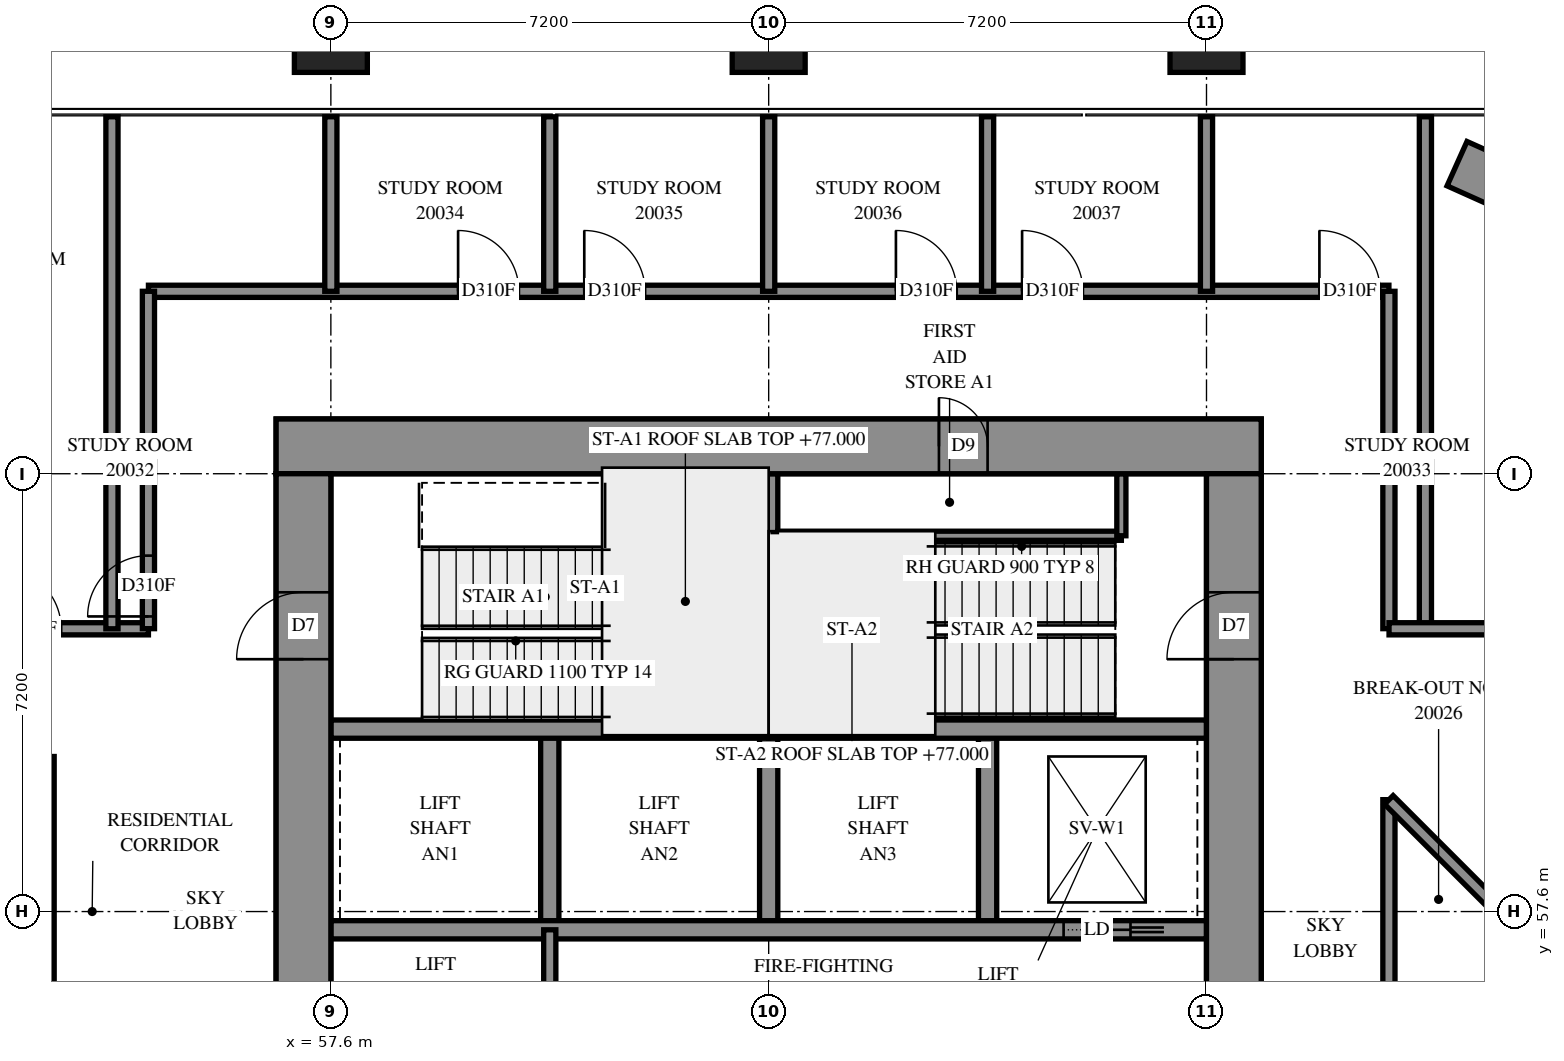
"""IFC4 building model, lengths in metres.
Left out: names, types, materials, properties, quantities, classifications, styles, units other than length and angle.
Written with IfcOpenShell. Run it as: python <this file> out.ifc"""

import sys

from ifc_helpers import new_model, si_unit, direction, frame, frame_2d, origin, origin_2d, place, context, subcontext, project, spatial, rectangle, extrude, element, fill, save


model = new_model("IFC4")
c1 = context("Model", 3, precision=1e-05, world=origin(), true_north=direction((0.0, 1.0)))
c2 = subcontext(c1, "Body", "Model", "MODEL_VIEW")
j1 = project(units=[si_unit("LENGTHUNIT", "METRE"), si_unit("PLANEANGLEUNIT", "RADIAN")], contexts=[c1])
p1 = place(None, origin())
s1 = spatial("IfcSite", under=j1, at=p1, CompositionType="ELEMENT")
p2 = place(p1, origin())
s2 = spatial("IfcBuilding", under=s1, at=p2, CompositionType="ELEMENT")
p3 = place(p2, frame((0.0, 0.0, 77.0)))
s3 = spatial("IfcBuildingStorey", under=s2, at=p3, CompositionType="ELEMENT", Elevation=77.0)
for number, where, z_axis, x_axis in (
    (1, (57.6, 72.0, 0.0), (0.0, 0.0, 1.0), (1.0, 0.0, 0.0)),
    (2, (64.8, 72.0, 0.0), (0.0, 0.0, 1.0), (1.0, 0.0, 0.0)),
    (3, (72.0, 72.0, 0.0), (0.0, 0.0, 1.0), (1.0, 0.0, 0.0)),
):
    element("IfcColumn", number, at=place(p3, frame(where, z_axis=z_axis, x_axis=x_axis)), inside=s3, PredefinedType="COLUMN", context=c2, shape_type="SweptSolid", body=[
        extrude(rectangle(XDim=1.2, YDim=1.2, at=origin_2d()), origin(), (0.0, 0.0, 1.0), 3.9),
    ])
p4 = place(p3, frame((56.7, 65.25, -0.3), z_axis=(0.0, 0.0, 1.0), x_axis=(1.0, 0.0, 0.0)))
e4 = element("IfcWall", 4, at=p4, inside=s3, PredefinedType="SHEAR", context=c2, shape_type="SweptSolid", body=[
    extrude(rectangle(XDim=16.2, YDim=0.9, at=frame_2d((8.1, 0.0))), origin(), (0.0, 0.0, 1.0), 3.5),
])
p5 = place(p4, frame((10.9, 0.0, 0.3)))
e5 = element("IfcOpeningElement", 5, at=p5, cuts=e4, PredefinedType="OPENING", context=c2, shape_type="SweptSolid", body=[
    extrude(rectangle(XDim=0.8, YDim=2.1, at=frame_2d((0.4, 1.05))), frame((0.0, 0.46, 0.0), z_axis=(0.0, -1.0, 0.0), x_axis=(1.0, 0.0, 0.0)), (0.0, 0.0, 1.0), 0.92),
])
p6 = place(p3, frame((57.15, 50.4, -0.3), z_axis=(0.0, 0.0, 1.0), x_axis=(0.0, 1.0, 0.0)))
e6 = element("IfcWall", 6, at=p6, inside=s3, PredefinedType="SHEAR", context=c2, shape_type="SweptSolid", body=[
    extrude(rectangle(XDim=14.4, YDim=0.9, at=frame_2d((7.2, 0.0))), origin(), (0.0, 0.0, 1.0), 3.5),
])
p7 = place(p6, frame((4.55, 0.0, 0.3)))
e7 = element("IfcOpeningElement", 7, at=p7, cuts=e6, PredefinedType="OPENING", context=c2, shape_type="SweptSolid", body=[
    extrude(rectangle(XDim=1.1, YDim=2.1, at=frame_2d((0.55, 1.05))), frame((0.0, 0.46, 0.0), z_axis=(0.0, -1.0, 0.0), x_axis=(1.0, 0.0, 0.0)), (0.0, 0.0, 1.0), 0.92),
])
p8 = place(p6, frame((11.35, 0.0, 0.3)))
e8 = element("IfcOpeningElement", 8, at=p8, cuts=e6, PredefinedType="OPENING", context=c2, shape_type="SweptSolid", body=[
    extrude(rectangle(XDim=1.1, YDim=2.1, at=frame_2d((0.55, 1.05))), frame((0.0, 0.46, 0.0), z_axis=(0.0, -1.0, 0.0), x_axis=(1.0, 0.0, 0.0)), (0.0, 0.0, 1.0), 0.92),
])
p9 = place(p3, frame((72.45, 50.4, -0.3), z_axis=(0.0, 0.0, 1.0), x_axis=(0.0, 1.0, 0.0)))
e9 = element("IfcWall", 9, at=p9, inside=s3, PredefinedType="SHEAR", context=c2, shape_type="SweptSolid", body=[
    extrude(rectangle(XDim=14.4, YDim=0.9, at=frame_2d((7.2, 0.0))), origin(), (0.0, 0.0, 1.0), 3.5),
])
p10 = place(p9, frame((4.55, 0.0, 0.3)))
e10 = element("IfcOpeningElement", 10, at=p10, cuts=e9, PredefinedType="OPENING", context=c2, shape_type="SweptSolid", body=[
    extrude(rectangle(XDim=1.1, YDim=2.1, at=frame_2d((0.55, 1.05))), frame((0.0, 0.46, 0.0), z_axis=(0.0, -1.0, 0.0), x_axis=(1.0, 0.0, 0.0)), (0.0, 0.0, 1.0), 0.92),
])
p11 = place(p9, frame((11.35, 0.0, 0.3)))
e11 = element("IfcOpeningElement", 11, at=p11, cuts=e9, PredefinedType="OPENING", context=c2, shape_type="SweptSolid", body=[
    extrude(rectangle(XDim=1.1, YDim=2.1, at=frame_2d((0.55, 1.05))), frame((0.0, 0.46, 0.0), z_axis=(0.0, -1.0, 0.0), x_axis=(1.0, 0.0, 0.0)), (0.0, 0.0, 1.0), 0.92),
])
for number, where, z_axis, x_axis in (
    (12, (61.2, 57.3, 0.0), (0.0, 0.0, 1.0), (0.0, 1.0, 0.0)),
    (13, (64.8, 57.3, 0.0), (0.0, 0.0, 1.0), (0.0, 1.0, 0.0)),
    (14, (68.4, 57.3, 0.0), (0.0, 0.0, 1.0), (0.0, 1.0, 0.0)),
):
    element("IfcWall", number, at=place(p3, frame(where, z_axis=z_axis, x_axis=x_axis)), inside=s3, PredefinedType="SOLIDWALL", context=c2, shape_type="SweptSolid", body=[
        extrude(rectangle(XDim=3.3, YDim=0.3, at=frame_2d((1.65, 0.0))), origin(), (0.0, 0.0, 1.0), 3.9),
    ])
p12 = place(p3, frame((57.6, 57.3, 0.0), z_axis=(0.0, 0.0, 1.0), x_axis=(1.0, 0.0, 0.0)))
e15 = element("IfcWall", 15, at=p12, inside=s3, PredefinedType="SOLIDWALL", context=c2, shape_type="SweptSolid", body=[
    extrude(rectangle(XDim=14.4, YDim=0.3, at=frame_2d((7.2, 0.0))), origin(), (0.0, 0.0, 1.0), 3.9),
])
p13 = place(p12, frame((12.05, 0.0, 0.0)))
e16 = element("IfcOpeningElement", 16, at=p13, cuts=e15, PredefinedType="OPENING", context=c2, shape_type="SweptSolid", body=[
    extrude(rectangle(XDim=1.1, YDim=2.1, at=frame_2d((0.55, 1.05))), frame((0.0, 0.16, 0.0), z_axis=(0.0, -1.0, 0.0), x_axis=(1.0, 0.0, 0.0)), (0.0, 0.0, 1.0), 0.32),
])
for number, where, z_axis, x_axis in (
    (17, (57.6, 60.6, 0.0), (0.0, 0.0, 1.0), (1.0, 0.0, 0.0)),
    (18, (64.8, 60.6, 0.0), (0.0, 0.0, 1.0), (1.0, 0.0, 0.0)),
):
    element("IfcWall", number, at=place(p3, frame(where, z_axis=z_axis, x_axis=x_axis)), inside=s3, PredefinedType="SOLIDWALL", context=c2, shape_type="SweptSolid", body=[
        extrude(rectangle(XDim=7.2, YDim=0.3, at=frame_2d((3.6, 0.0))), origin(), (0.0, 0.0, 1.0), 3.9),
    ])
p14 = place(p3, frame((64.8, 60.6, 0.0), z_axis=(0.0, 0.0, 1.0), x_axis=(0.0, 1.0, 0.0)))
e19 = element("IfcWall", 19, at=p14, inside=s3, PredefinedType="SOLIDWALL", context=c2, shape_type="SweptSolid", body=[
    extrude(rectangle(XDim=4.2, YDim=0.3, at=frame_2d((2.1, 0.0))), origin(), (0.0, 0.0, 1.0), 3.9),
])
p15 = place(p3, frame((76.336, 49.408, -0.3), z_axis=(0.0, 0.0, 1.0), x_axis=(0.7071067812, 0.7071067812, 0.0)))
e20 = element("IfcWall", 20, at=p15, inside=s3, PredefinedType="SHEAR", context=c2, shape_type="SweptSolid", body=[
    extrude(rectangle(XDim=14.4, YDim=0.9, at=frame_2d((7.2, 0.0))), origin(), (0.0, 0.0, 1.0), 3.5),
])
p16 = place(p15, frame((4.55, 0.0, 0.3)))
e21 = element("IfcOpeningElement", 21, at=p16, cuts=e20, PredefinedType="OPENING", context=c2, shape_type="SweptSolid", body=[
    extrude(rectangle(XDim=1.1, YDim=2.1, at=frame_2d((0.55, 1.05))), frame((0.0, 0.46, 0.0), z_axis=(0.0, -1.0, 0.0), x_axis=(1.0, 0.0, 0.0)), (0.0, 0.0, 1.0), 0.92),
])
p17 = place(p15, frame((11.35, 0.0, 0.3)))
e22 = element("IfcOpeningElement", 22, at=p17, cuts=e20, PredefinedType="OPENING", context=c2, shape_type="SweptSolid", body=[
    extrude(rectangle(XDim=1.1, YDim=2.1, at=frame_2d((0.55, 1.05))), frame((0.0, 0.46, 0.0), z_axis=(0.0, -1.0, 0.0), x_axis=(1.0, 0.0, 0.0)), (0.0, 0.0, 1.0), 0.92),
])
p18 = place(p3, frame((79.28, 68.48, 0.0), z_axis=(0.0, 0.0, 1.0), x_axis=(-0.9122884657, 0.4095482333, 0.0)))
e23 = element("IfcWall", 23, at=p18, inside=s3, PredefinedType="SOLIDWALL", context=c2, shape_type="SweptSolid", body=[
    extrude(rectangle(XDim=3.464, YDim=0.8, at=frame_2d((1.732, 0.0))), origin(), (0.0, 0.0, 1.0), 0.65),
])
p19 = place(p3, frame((64.95, 63.78, 0.0), z_axis=(0.0, 0.0, 1.0), x_axis=(1.0, 0.0, 0.0)))
e24 = element("IfcWall", 24, at=p19, inside=s3, PredefinedType="PARTITIONING", context=c2, shape_type="SweptSolid", body=[
    extrude(rectangle(XDim=5.65, YDim=0.15, at=frame_2d((2.825, 0.0))), origin(), (0.0, 0.0, 1.0), 3.9),
])
p20 = place(p3, frame((70.6, 63.78, 0.0), z_axis=(0.0, 0.0, 1.0), x_axis=(0.0, 1.0, 0.0)))
e25 = element("IfcWall", 25, at=p20, inside=s3, PredefinedType="PARTITIONING", context=c2, shape_type="SweptSolid", body=[
    extrude(rectangle(XDim=1.02, YDim=0.15, at=frame_2d((0.51, 0.0))), origin(), (0.0, 0.0, 1.0), 3.9),
])
p21 = place(p3, frame((61.2, 53.7, 0.0), z_axis=(0.0, 0.0, 1.0), x_axis=(0.0, 1.0, 0.0)))
e26 = element("IfcWall", 26, at=p21, inside=s3, PredefinedType="PARTITIONING", context=c2, shape_type="SweptSolid", body=[
    extrude(rectangle(XDim=3.6, YDim=0.2, at=frame_2d((1.8, 0.0))), origin(), (0.0, 0.0, 1.0), 3.9),
])
p22 = place(p3, frame((33.452, 62.25, 0.0), z_axis=(0.0, 0.0, 1.0), x_axis=(1.0, 0.0, 0.0)))
e27 = element("IfcWall", 27, at=p22, inside=s3, PredefinedType="PARTITIONING", context=c2, shape_type="SweptSolid", body=[
    extrude(rectangle(XDim=21.148, YDim=0.2, at=frame_2d((10.574, 0.0))), origin(), (0.0, 0.0, 1.0), 3.9),
])
p23 = place(p22, frame((6.106, 0.0, 0.0)))
e28 = element("IfcOpeningElement", 28, at=p23, cuts=e27, PredefinedType="OPENING", context=c2, shape_type="SweptSolid", body=[
    extrude(rectangle(XDim=1.0, YDim=2.1, at=frame_2d((0.5, 1.05))), frame((0.0, 0.11, 0.0), z_axis=(0.0, -1.0, 0.0), x_axis=(1.0, 0.0, 0.0)), (0.0, 0.0, 1.0), 0.22),
])
p24 = place(p22, frame((13.306, 0.0, 0.0)))
e29 = element("IfcOpeningElement", 29, at=p24, cuts=e27, PredefinedType="OPENING", context=c2, shape_type="SweptSolid", body=[
    extrude(rectangle(XDim=1.0, YDim=2.1, at=frame_2d((0.5, 1.05))), frame((0.0, 0.11, 0.0), z_axis=(0.0, -1.0, 0.0), x_axis=(1.0, 0.0, 0.0)), (0.0, 0.0, 1.0), 0.22),
])
p25 = place(p22, frame((18.713, 0.0, 0.0)))
e30 = element("IfcOpeningElement", 30, at=p25, cuts=e27, PredefinedType="OPENING", context=c2, shape_type="SweptSolid", body=[
    extrude(rectangle(XDim=1.0, YDim=2.1, at=frame_2d((0.5, 1.05))), frame((0.0, 0.11, 0.0), z_axis=(0.0, -1.0, 0.0), x_axis=(1.0, 0.0, 0.0)), (0.0, 0.0, 1.0), 0.22),
])
p26 = place(p3, frame((54.6, 67.8, 0.0), z_axis=(0.0, 0.0, 1.0), x_axis=(1.0, 0.0, 0.0)))
e31 = element("IfcWall", 31, at=p26, inside=s3, PredefinedType="PARTITIONING", context=c2, shape_type="SweptSolid", body=[
    extrude(rectangle(XDim=20.4, YDim=0.2, at=frame_2d((10.2, 0.0))), origin(), (0.0, 0.0, 1.0), 3.9),
])
p27 = place(p26, frame((19.257, 0.0, 0.0)))
e32 = element("IfcOpeningElement", 32, at=p27, cuts=e31, PredefinedType="OPENING", context=c2, shape_type="SweptSolid", body=[
    extrude(rectangle(XDim=1.0, YDim=2.1, at=frame_2d((0.5, 1.05))), frame((0.0, 0.11, 0.0), z_axis=(0.0, -1.0, 0.0), x_axis=(1.0, 0.0, 0.0)), (0.0, 0.0, 1.0), 0.22),
])
p28 = place(p26, frame((5.093, 0.0, 0.0)))
e33 = element("IfcOpeningElement", 33, at=p28, cuts=e31, PredefinedType="OPENING", context=c2, shape_type="SweptSolid", body=[
    extrude(rectangle(XDim=1.0, YDim=2.1, at=frame_2d((0.5, 1.05))), frame((0.0, 0.11, 0.0), z_axis=(0.0, -1.0, 0.0), x_axis=(1.0, 0.0, 0.0)), (0.0, 0.0, 1.0), 0.22),
])
p29 = place(p26, frame((7.168, 0.0, 0.0)))
e34 = element("IfcOpeningElement", 34, at=p29, cuts=e31, PredefinedType="OPENING", context=c2, shape_type="SweptSolid", body=[
    extrude(rectangle(XDim=1.0, YDim=2.1, at=frame_2d((0.5, 1.05))), frame((0.0, 0.11, 0.0), z_axis=(0.0, -1.0, 0.0), x_axis=(1.0, 0.0, 0.0)), (0.0, 0.0, 1.0), 0.22),
])
p30 = place(p26, frame((12.293, 0.0, 0.0)))
e35 = element("IfcOpeningElement", 35, at=p30, cuts=e31, PredefinedType="OPENING", context=c2, shape_type="SweptSolid", body=[
    extrude(rectangle(XDim=1.0, YDim=2.1, at=frame_2d((0.5, 1.05))), frame((0.0, 0.11, 0.0), z_axis=(0.0, -1.0, 0.0), x_axis=(1.0, 0.0, 0.0)), (0.0, 0.0, 1.0), 0.22),
])
p31 = place(p26, frame((14.367, 0.0, 0.0)))
e36 = element("IfcOpeningElement", 36, at=p31, cuts=e31, PredefinedType="OPENING", context=c2, shape_type="SweptSolid", body=[
    extrude(rectangle(XDim=1.0, YDim=2.1, at=frame_2d((0.5, 1.05))), frame((0.0, 0.11, 0.0), z_axis=(0.0, -1.0, 0.0), x_axis=(1.0, 0.0, 0.0)), (0.0, 0.0, 1.0), 0.22),
])
for number, where, z_axis, x_axis in (
    (37, (54.0, 62.25, 0.0), (0.0, 0.0, 1.0), (0.0, 1.0, 0.0)),
    (38, (75.6, 62.25, 0.0), (0.0, 0.0, 1.0), (0.0, 1.0, 0.0)),
):
    element("IfcWall", number, at=place(p3, frame(where, z_axis=z_axis, x_axis=x_axis)), inside=s3, PredefinedType="PARTITIONING", context=c2, shape_type="SweptSolid", body=[
        extrude(rectangle(XDim=8.42, YDim=0.2, at=frame_2d((4.21, 0.0))), origin(), (0.0, 0.0, 1.0), 3.9),
    ])
p32 = place(p3, frame((54.6, 62.252, 0.0), z_axis=(0.0, 0.0, 1.0), x_axis=(0.0, 1.0, 0.0)))
e39 = element("IfcWall", 39, at=p32, inside=s3, PredefinedType="PARTITIONING", context=c2, shape_type="SweptSolid", body=[
    extrude(rectangle(XDim=5.548, YDim=0.2, at=frame_2d((2.774, 0.0))), origin(), (0.0, 0.0, 1.0), 3.9),
])
p33 = place(p32, frame((0.201, 0.0, 0.0)))
e40 = element("IfcOpeningElement", 40, at=p33, cuts=e39, PredefinedType="OPENING", context=c2, shape_type="SweptSolid", body=[
    extrude(rectangle(XDim=1.0, YDim=2.1, at=frame_2d((0.5, 1.05))), frame((0.0, 0.11, 0.0), z_axis=(0.0, -1.0, 0.0), x_axis=(1.0, 0.0, 0.0)), (0.0, 0.0, 1.0), 0.22),
])
p34 = place(p3, frame((75.0, 62.252, 0.0), z_axis=(0.0, 0.0, 1.0), x_axis=(0.0, 1.0, 0.0)))
e41 = element("IfcWall", 41, at=p34, inside=s3, PredefinedType="PARTITIONING", context=c2, shape_type="SweptSolid", body=[
    extrude(rectangle(XDim=5.548, YDim=0.2, at=frame_2d((2.774, 0.0))), origin(), (0.0, 0.0, 1.0), 3.9),
])
p35 = place(p3, frame((52.95, 55.052, 0.0), z_axis=(0.0, 0.0, 1.0), x_axis=(0.0, 1.0, 0.0)))
e42 = element("IfcWall", 42, at=p35, inside=s3, PredefinedType="PARTITIONING", context=c2, shape_type="SweptSolid", body=[
    extrude(rectangle(XDim=5.098, YDim=0.2, at=frame_2d((2.549, 0.0))), origin(), (0.0, 0.0, 1.0), 3.9),
])
p36 = place(p3, frame((75.0, 55.052, 0.0), z_axis=(0.0, 0.0, 1.0), x_axis=(0.0, 1.0, 0.0)))
e43 = element("IfcWall", 43, at=p36, inside=s3, PredefinedType="PARTITIONING", context=c2, shape_type="SweptSolid", body=[
    extrude(rectangle(XDim=4.388, YDim=0.2, at=frame_2d((2.194, 0.0))), origin(), (0.0, 0.0, 1.0), 3.9),
])
p37 = place(p3, frame((75.002, 62.25, 0.0), z_axis=(0.0, 0.0, 1.0), x_axis=(1.0, 0.0, 0.0)))
e44 = element("IfcWall", 44, at=p37, inside=s3, PredefinedType="PARTITIONING", context=c2, shape_type="SweptSolid", body=[
    extrude(rectangle(XDim=4.198, YDim=0.2, at=frame_2d((2.099, 0.0))), origin(), (0.0, 0.0, 1.0), 3.9),
])
p38 = place(p3, frame((74.999, 59.437, 0.0), z_axis=(0.0, 0.0, 1.0), x_axis=(0.7071067812, -0.7071067812, 0.0)))
e45 = element("IfcWall", 45, at=p38, inside=s3, PredefinedType="PARTITIONING", context=c2, shape_type="SweptSolid", body=[
    extrude(rectangle(XDim=3.321, YDim=0.2, at=frame_2d((1.66, 0.0))), origin(), (0.0, 0.0, 1.0), 3.9),
])
for number, where, z_axis, x_axis in (
    (46, (57.6, 67.8, 0.0), (0.0, 0.0, 1.0), (0.0, 1.0, 0.0)),
    (47, (61.2, 67.8, 0.0), (0.0, 0.0, 1.0), (0.0, 1.0, 0.0)),
    (48, (64.8, 67.8, 0.0), (0.0, 0.0, 1.0), (0.0, 1.0, 0.0)),
    (49, (68.4, 67.8, 0.0), (0.0, 0.0, 1.0), (0.0, 1.0, 0.0)),
    (50, (72.0, 67.8, 0.0), (0.0, 0.0, 1.0), (0.0, 1.0, 0.0)),
):
    element("IfcWall", number, at=place(p3, frame(where, z_axis=z_axis, x_axis=x_axis)), inside=s3, PredefinedType="PARTITIONING", context=c2, shape_type="SweptSolid", body=[
        extrude(rectangle(XDim=2.87, YDim=0.2, at=frame_2d((1.435, 0.0))), origin(), (0.0, 0.0, 1.0), 3.9),
    ])
p39 = place(p5, origin())
e51 = element("IfcDoor", 51, at=p39, inside=s3, OperationType="SINGLE_SWING_RIGHT", PredefinedType="DOOR", context=c2, shape_type="SweptSolid", body=[
    extrude(rectangle(XDim=0.8, YDim=2.1, at=frame_2d((0.4, 1.05))), frame((0.0, -0.39, 0.0), z_axis=(0.0, -1.0, 0.0), x_axis=(1.0, 0.0, 0.0)), (0.0, 0.0, 1.0), 0.05),
])
fill(e5, e51)
p40 = place(p8, origin())
e52 = element("IfcDoor", 52, at=p40, inside=s3, OperationType="SINGLE_SWING_LEFT", PredefinedType="DOOR", context=c2, shape_type="SweptSolid", body=[
    extrude(rectangle(XDim=1.1, YDim=2.1, at=frame_2d((0.55, 1.05))), frame((0.0, 0.025, 0.0), z_axis=(0.0, -1.0, 0.0), x_axis=(1.0, 0.0, 0.0)), (0.0, 0.0, 1.0), 0.05),
])
fill(e8, e52)
p41 = place(p11, origin())
e53 = element("IfcDoor", 53, at=p41, inside=s3, OperationType="SINGLE_SWING_RIGHT", PredefinedType="DOOR", context=c2, shape_type="SweptSolid", body=[
    extrude(rectangle(XDim=1.1, YDim=2.1, at=frame_2d((0.55, 1.05))), frame((0.0, 0.025, 0.0), z_axis=(0.0, -1.0, 0.0), x_axis=(1.0, 0.0, 0.0)), (0.0, 0.0, 1.0), 0.05),
])
fill(e11, e53)
p42 = place(p13, origin())
e54 = element("IfcDoor", 54, at=p42, inside=s3, OperationType="SLIDING_TO_RIGHT", PredefinedType="DOOR", context=c2, shape_type="SweptSolid", body=[
    extrude(rectangle(XDim=1.1, YDim=2.1, at=frame_2d((0.55, 1.05))), frame((0.0, 0.025, 0.0), z_axis=(0.0, -1.0, 0.0), x_axis=(1.0, 0.0, 0.0)), (0.0, 0.0, 1.0), 0.05),
])
fill(e16, e54)
p43 = place(p25, origin())
e55 = element("IfcDoor", 55, at=p43, inside=s3, OperationType="SINGLE_SWING_RIGHT", PredefinedType="DOOR", context=c2, shape_type="SweptSolid", body=[
    extrude(rectangle(XDim=1.0, YDim=2.1, at=frame_2d((0.5, 1.05))), frame((0.0, 0.025, 0.0), z_axis=(0.0, -1.0, 0.0), x_axis=(1.0, 0.0, 0.0)), (0.0, 0.0, 1.0), 0.05),
])
fill(e30, e55)
p44 = place(p33, origin())
e56 = element("IfcDoor", 56, at=p44, inside=s3, OperationType="SINGLE_SWING_LEFT", PredefinedType="DOOR", context=c2, shape_type="SweptSolid", body=[
    extrude(rectangle(XDim=1.0, YDim=2.1, at=frame_2d((0.5, 1.05))), frame((0.0, 0.025, 0.0), z_axis=(0.0, -1.0, 0.0), x_axis=(1.0, 0.0, 0.0)), (0.0, 0.0, 1.0), 0.05),
])
fill(e40, e56)
p45 = place(p27, origin())
e57 = element("IfcDoor", 57, at=p45, inside=s3, OperationType="SINGLE_SWING_RIGHT", PredefinedType="DOOR", context=c2, shape_type="SweptSolid", body=[
    extrude(rectangle(XDim=1.0, YDim=2.1, at=frame_2d((0.5, 1.05))), frame((0.0, 0.025, 0.0), z_axis=(0.0, -1.0, 0.0), x_axis=(1.0, 0.0, 0.0)), (0.0, 0.0, 1.0), 0.05),
])
fill(e32, e57)
p46 = place(p28, origin())
e58 = element("IfcDoor", 58, at=p46, inside=s3, OperationType="SINGLE_SWING_RIGHT", PredefinedType="DOOR", context=c2, shape_type="SweptSolid", body=[
    extrude(rectangle(XDim=1.0, YDim=2.1, at=frame_2d((0.5, 1.05))), frame((0.0, 0.025, 0.0), z_axis=(0.0, -1.0, 0.0), x_axis=(1.0, 0.0, 0.0)), (0.0, 0.0, 1.0), 0.05),
])
fill(e33, e58)
p47 = place(p29, origin())
e59 = element("IfcDoor", 59, at=p47, inside=s3, OperationType="SINGLE_SWING_LEFT", PredefinedType="DOOR", context=c2, shape_type="SweptSolid", body=[
    extrude(rectangle(XDim=1.0, YDim=2.1, at=frame_2d((0.5, 1.05))), frame((0.0, 0.025, 0.0), z_axis=(0.0, -1.0, 0.0), x_axis=(1.0, 0.0, 0.0)), (0.0, 0.0, 1.0), 0.05),
])
fill(e34, e59)
p48 = place(p30, origin())
e60 = element("IfcDoor", 60, at=p48, inside=s3, OperationType="SINGLE_SWING_RIGHT", PredefinedType="DOOR", context=c2, shape_type="SweptSolid", body=[
    extrude(rectangle(XDim=1.0, YDim=2.1, at=frame_2d((0.5, 1.05))), frame((0.0, 0.025, 0.0), z_axis=(0.0, -1.0, 0.0), x_axis=(1.0, 0.0, 0.0)), (0.0, 0.0, 1.0), 0.05),
])
fill(e35, e60)
p49 = place(p31, origin())
e61 = element("IfcDoor", 61, at=p49, inside=s3, OperationType="SINGLE_SWING_LEFT", PredefinedType="DOOR", context=c2, shape_type="SweptSolid", body=[
    extrude(rectangle(XDim=1.0, YDim=2.1, at=frame_2d((0.5, 1.05))), frame((0.0, 0.025, 0.0), z_axis=(0.0, -1.0, 0.0), x_axis=(1.0, 0.0, 0.0)), (0.0, 0.0, 1.0), 0.05),
])
fill(e36, e61)
save(model, sys.argv[1])
